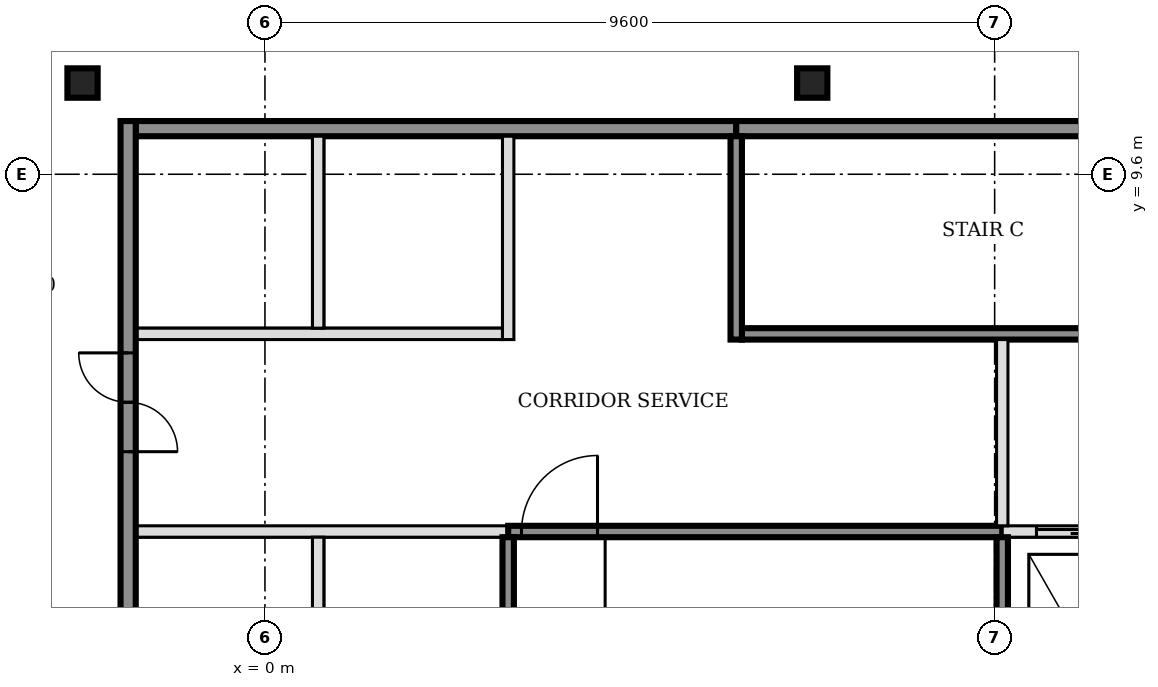
"""IFC4 building model, lengths in metres.
Left out: names, types, materials, properties, quantities, classifications, styles, units other than length and angle.
Written with IfcOpenShell. Run it as: python <this file> out.ifc"""

import sys

from ifc_helpers import new_model, si_unit, direction, frame, frame_2d, origin, origin_2d, place, context, subcontext, project, spatial, rectangle, hollow_rectangle, i_section, extrude, element, fill, save


model = new_model("IFC4")
c1 = context("Model", 3, precision=1e-05, world=origin(), true_north=direction((0.0, 1.0)))
c2 = subcontext(c1, "Body", "Model", "MODEL_VIEW")
j1 = project(units=[si_unit("LENGTHUNIT", "METRE"), si_unit("PLANEANGLEUNIT", "RADIAN")], contexts=[c1])
p1 = place(None, origin())
s1 = spatial("IfcSite", under=j1, at=p1, CompositionType="ELEMENT")
p2 = place(p1, origin())
s2 = spatial("IfcBuilding", under=s1, at=p2, CompositionType="ELEMENT")
p3 = place(p2, frame((0.0, 0.0, 295.8)))
s3 = spatial("IfcBuildingStorey", under=s2, at=p3, CompositionType="ELEMENT", Elevation=295.8)
p4 = place(p3, frame((7.2, 10.8, 5.7), z_axis=(0.0, 0.0, 1.0), x_axis=(1.0, 0.0, 0.0)))
e1 = element("IfcColumn", 1, at=p4, inside=s3, PredefinedType="COLUMN", context=c2, shape_type="SweptSolid", body=[
    extrude(hollow_rectangle(XDim=0.3, YDim=0.3, WallThickness=0.016, InnerFilletRadius=0.016, OuterFilletRadius=0.024, at=origin_2d()), origin(), (0.0, 0.0, 1.0), 6.632),
])
for number, where, z_axis, x_axis in (
    (2, (-2.4, 10.8, -0.2), (0.0, 0.0, 1.0), (1.0, 0.0, 0.0)),
    (3, (7.2, 10.8, -0.2), (0.0, 0.0, 1.0), (1.0, 0.0, 0.0)),
):
    element("IfcColumn", number, at=place(p3, frame(where, z_axis=z_axis, x_axis=x_axis)), inside=s3, PredefinedType="COLUMN", context=c2, shape_type="SweptSolid", body=[
        extrude(i_section(OverallWidth=0.398, OverallDepth=0.387, WebThickness=0.021, FlangeThickness=0.033, FilletRadius=0.015, at=origin_2d()), origin(), (0.0, 0.0, 1.0), 5.9),
    ])
p5 = place(p3, frame((-1.7, 4.9, 0.0), z_axis=(0.0, 0.0, 1.0), x_axis=(1.0, 0.0, 0.0)))
e4 = element("IfcWall", 4, at=p5, inside=s3, PredefinedType="SOLIDWALL", context=c2, shape_type="SweptSolid", body=[
    extrude(rectangle(XDim=4.9, YDim=0.15, at=frame_2d((2.45, 0.0))), origin(), (0.0, 0.0, 1.0), 5.7),
])
p6 = place(p3, frame((3.2, 4.9, 0.0), z_axis=(0.0, 0.0, 1.0), x_axis=(1.0, 0.0, 0.0)))
e5 = element("IfcWall", 5, at=p6, inside=s3, PredefinedType="SOLIDWALL", context=c2, shape_type="SweptSolid", body=[
    extrude(rectangle(XDim=6.5, YDim=0.15, at=frame_2d((3.25, 0.0))), origin(), (0.0, 0.0, 1.0), 5.7),
])
p7 = place(p6, frame((0.175, 0.0, 0.0)))
e6 = element("IfcOpeningElement", 6, at=p7, cuts=e5, PredefinedType="OPENING", context=c2, shape_type="SweptSolid", body=[
    extrude(rectangle(XDim=1.0, YDim=2.1, at=frame_2d((0.5, 1.05))), frame((0.0, 0.085, 0.0), z_axis=(0.0, -1.0, 0.0), x_axis=(1.0, 0.0, 0.0)), (0.0, 0.0, 1.0), 0.17),
])
p8 = place(p3, frame((9.7, 4.9, 0.0), z_axis=(0.0, 0.0, 1.0), x_axis=(1.0, 0.0, 0.0)))
e7 = element("IfcWall", 7, at=p8, inside=s3, PredefinedType="SOLIDWALL", context=c2, shape_type="SweptSolid", body=[
    extrude(rectangle(XDim=6.4, YDim=0.15, at=frame_2d((3.2, 0.0))), origin(), (0.0, 0.0, 1.0), 5.7),
])
p9 = place(p8, frame((0.45, 0.0, 0.0)))
e8 = element("IfcOpeningElement", 8, at=p9, cuts=e7, PredefinedType="OPENING", context=c2, shape_type="SweptSolid", body=[
    extrude(rectangle(XDim=1.0, YDim=2.1, at=frame_2d((0.5, 1.05))), frame((0.0, 0.085, 0.0), z_axis=(0.0, -1.0, 0.0), x_axis=(1.0, 0.0, 0.0)), (0.0, 0.0, 1.0), 0.17),
])
p10 = place(p8, frame((2.35, 0.0, 0.0)))
e9 = element("IfcOpeningElement", 9, at=p10, cuts=e7, PredefinedType="OPENING", context=c2, shape_type="SweptSolid", body=[
    extrude(rectangle(XDim=1.0, YDim=2.1, at=frame_2d((0.5, 1.05))), frame((0.0, 0.085, 0.0), z_axis=(0.0, -1.0, 0.0), x_axis=(1.0, 0.0, 0.0)), (0.0, 0.0, 1.0), 0.17),
])
p11 = place(p8, frame((4.7, 0.0, 0.0)))
e10 = element("IfcOpeningElement", 10, at=p11, cuts=e7, PredefinedType="OPENING", context=c2, shape_type="SweptSolid", body=[
    extrude(rectangle(XDim=0.9, YDim=2.1, at=frame_2d((0.45, 1.05))), frame((0.0, 0.085, 0.0), z_axis=(0.0, -1.0, 0.0), x_axis=(1.0, 0.0, 0.0)), (0.0, 0.0, 1.0), 0.17),
])
p12 = place(p3, frame((-1.7, 7.5, 0.0), z_axis=(0.0, 0.0, 1.0), x_axis=(1.0, 0.0, 0.0)))
e11 = element("IfcWall", 11, at=p12, inside=s3, PredefinedType="SOLIDWALL", context=c2, shape_type="SweptSolid", body=[
    extrude(rectangle(XDim=4.825, YDim=0.15, at=frame_2d((2.413, 0.0))), origin(), (0.0, 0.0, 1.0), 5.7),
])
p13 = place(p3, frame((6.275, 7.5, 0.0), z_axis=(0.0, 0.0, 1.0), x_axis=(1.0, 0.0, 0.0)))
e12 = element("IfcWall", 12, at=p13, inside=s3, PredefinedType="SOLIDWALL", context=c2, shape_type="SweptSolid", body=[
    extrude(rectangle(XDim=6.425, YDim=0.15, at=frame_2d((3.212, 0.0))), origin(), (0.0, 0.0, 1.0), 5.7),
])
p14 = place(p13, frame((5.225, 0.0, 0.0)))
e13 = element("IfcOpeningElement", 13, at=p14, cuts=e12, PredefinedType="OPENING", context=c2, shape_type="SweptSolid", body=[
    extrude(rectangle(XDim=1.0, YDim=2.1, at=frame_2d((0.5, 1.05))), frame((0.0, 0.085, 0.0), z_axis=(0.0, -1.0, 0.0), x_axis=(1.0, 0.0, 0.0)), (0.0, 0.0, 1.0), 0.17),
])
p15 = place(p3, frame((-1.7, 10.2, 0.0), z_axis=(0.0, 0.0, 1.0), x_axis=(1.0, 0.0, 0.0)))
e14 = element("IfcWall", 14, at=p15, inside=s3, PredefinedType="SOLIDWALL", context=c2, shape_type="SweptSolid", body=[
    extrude(rectangle(XDim=7.9, YDim=0.2, at=frame_2d((3.95, 0.0))), origin(), (0.0, 0.0, 1.0), 5.7),
])
p16 = place(p3, frame((6.2, 10.2, 0.0), z_axis=(0.0, 0.0, 1.0), x_axis=(1.0, 0.0, 0.0)))
e15 = element("IfcWall", 15, at=p16, inside=s3, PredefinedType="SOLIDWALL", context=c2, shape_type="SweptSolid", body=[
    extrude(rectangle(XDim=6.5, YDim=0.2, at=frame_2d((3.25, 0.0))), origin(), (0.0, 0.0, 1.0), 5.7),
])
p17 = place(p3, frame((-1.8, -5.5, 0.0), z_axis=(0.0, 0.0, 1.0), x_axis=(0.0, 1.0, 0.0)))
e16 = element("IfcWall", 16, at=p17, inside=s3, PredefinedType="SOLIDWALL", context=c2, shape_type="SweptSolid", body=[
    extrude(rectangle(XDim=15.8, YDim=0.2, at=frame_2d((7.9, 0.0))), origin(), (0.0, 0.0, 1.0), 5.7),
])
p18 = place(p17, frame((3.05, 0.0, 0.0)))
e17 = element("IfcOpeningElement", 17, at=p18, cuts=e16, PredefinedType="OPENING", context=c2, shape_type="SweptSolid", body=[
    extrude(rectangle(XDim=1.3, YDim=2.1, at=frame_2d((0.65, 1.05))), frame((0.0, 0.11, 0.0), z_axis=(0.0, -1.0, 0.0), x_axis=(1.0, 0.0, 0.0)), (0.0, 0.0, 1.0), 0.22),
])
p19 = place(p17, frame((11.45, 0.0, 0.0)))
e18 = element("IfcOpeningElement", 18, at=p19, cuts=e16, PredefinedType="OPENING", context=c2, shape_type="SweptSolid", body=[
    extrude(rectangle(XDim=1.3, YDim=2.1, at=frame_2d((0.65, 1.05))), frame((0.0, 0.11, 0.0), z_axis=(0.0, -1.0, 0.0), x_axis=(1.0, 0.0, 0.0)), (0.0, 0.0, 1.0), 0.22),
])
p20 = place(p3, frame((0.7, 2.275, 0.0), z_axis=(0.0, 0.0, 1.0), x_axis=(0.0, 1.0, 0.0)))
e19 = element("IfcWall", 19, at=p20, inside=s3, PredefinedType="SOLIDWALL", context=c2, shape_type="SweptSolid", body=[
    extrude(rectangle(XDim=2.55, YDim=0.15, at=frame_2d((1.275, 0.0))), origin(), (0.0, 0.0, 1.0), 5.7),
])
p21 = place(p3, frame((0.7, 7.575, 0.0), z_axis=(0.0, 0.0, 1.0), x_axis=(0.0, 1.0, 0.0)))
e20 = element("IfcWall", 20, at=p21, inside=s3, PredefinedType="SOLIDWALL", context=c2, shape_type="SweptSolid", body=[
    extrude(rectangle(XDim=2.525, YDim=0.15, at=frame_2d((1.263, 0.0))), origin(), (0.0, 0.0, 1.0), 5.7),
])
p22 = place(p3, frame((3.2, 2.275, 0.0), z_axis=(0.0, 0.0, 1.0), x_axis=(0.0, 1.0, 0.0)))
e21 = element("IfcWall", 21, at=p22, inside=s3, PredefinedType="SOLIDWALL", context=c2, shape_type="SweptSolid", body=[
    extrude(rectangle(XDim=2.55, YDim=0.15, at=frame_2d((1.275, 0.0))), origin(), (0.0, 0.0, 1.0), 5.7),
])
for number, where, z_axis, x_axis in (
    (22, (3.2, 7.425, 0.0), (0.0, 0.0, 1.0), (0.0, 1.0, 0.0)),
    (23, (6.2, 7.425, 0.0), (0.0, 0.0, 1.0), (0.0, 1.0, 0.0)),
):
    element("IfcWall", number, at=place(p3, frame(where, z_axis=z_axis, x_axis=x_axis)), inside=s3, PredefinedType="SOLIDWALL", context=c2, shape_type="SweptSolid", body=[
        extrude(rectangle(XDim=2.675, YDim=0.15, at=frame_2d((1.337, 0.0))), origin(), (0.0, 0.0, 1.0), 5.7),
    ])
p23 = place(p3, frame((9.7, 2.275, 0.0), z_axis=(0.0, 0.0, 1.0), x_axis=(0.0, 1.0, 0.0)))
e24 = element("IfcWall", 24, at=p23, inside=s3, PredefinedType="SOLIDWALL", context=c2, shape_type="SweptSolid", body=[
    extrude(rectangle(XDim=2.55, YDim=0.15, at=frame_2d((1.275, 0.0))), origin(), (0.0, 0.0, 1.0), 5.7),
])
p24 = place(p3, frame((9.7, 4.975, 0.0), z_axis=(0.0, 0.0, 1.0), x_axis=(0.0, 1.0, 0.0)))
e25 = element("IfcWall", 25, at=p24, inside=s3, PredefinedType="SOLIDWALL", context=c2, shape_type="SweptSolid", body=[
    extrude(rectangle(XDim=2.45, YDim=0.15, at=frame_2d((1.225, 0.0))), origin(), (0.0, 0.0, 1.0), 5.7),
])
p25 = place(p9, origin())
e26 = element("IfcDoor", 26, at=p25, inside=s3, OperationType="DOUBLE_DOOR_SLIDING", PredefinedType="DOOR", context=c2, shape_type="SweptSolid", body=[
    extrude(rectangle(XDim=1.0, YDim=2.1, at=frame_2d((0.5, 1.05))), frame((0.0, 0.025, 0.0), z_axis=(0.0, -1.0, 0.0), x_axis=(1.0, 0.0, 0.0)), (0.0, 0.0, 1.0), 0.05),
])
fill(e8, e26)
p26 = place(p7, origin())
e27 = element("IfcDoor", 27, at=p26, inside=s3, OperationType="SINGLE_SWING_RIGHT", PredefinedType="DOOR", context=c2, shape_type="SweptSolid", body=[
    extrude(rectangle(XDim=1.0, YDim=2.1, at=frame_2d((0.5, 1.05))), frame((0.0, 0.025, 0.0), z_axis=(0.0, -1.0, 0.0), x_axis=(1.0, 0.0, 0.0)), (0.0, 0.0, 1.0), 0.05),
])
fill(e6, e27)
p27 = place(p19, origin())
e28 = element("IfcDoor", 28, at=p27, inside=s3, OperationType="DOUBLE_DOOR_SINGLE_SWING", PredefinedType="DOOR", context=c2, shape_type="SweptSolid", body=[
    extrude(rectangle(XDim=1.3, YDim=2.1, at=frame_2d((0.65, 1.05))), frame((0.0, 0.025, 0.0), z_axis=(0.0, -1.0, 0.0), x_axis=(1.0, 0.0, 0.0)), (0.0, 0.0, 1.0), 0.05),
])
fill(e18, e28)
save(model, sys.argv[1])
